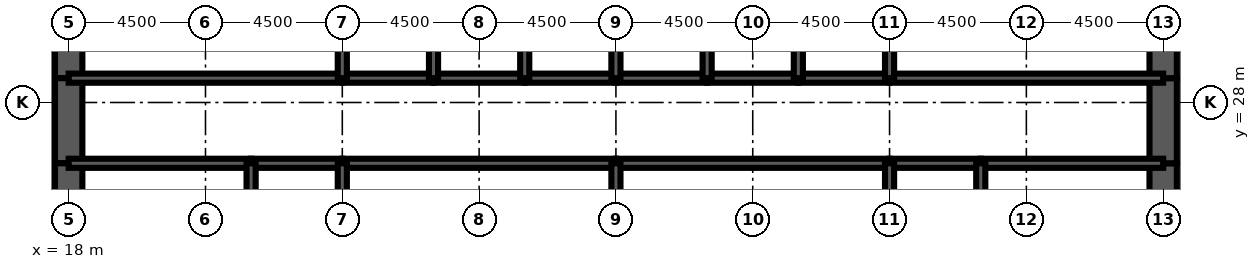
"""IFC4 building model, lengths in metres.
Left out: names, types, materials, properties, quantities, classifications, styles, units other than length and angle.
Written with IfcOpenShell. Run it as: python <this file> out.ifc"""

import sys

from ifc_helpers import new_model, si_unit, direction, frame, frame_2d, origin, place, context, subcontext, project, spatial, rectangle, extrude, element, fill, save


model = new_model("IFC4")
c1 = context("Model", 3, precision=1e-05, world=origin(), true_north=direction((0.0, 1.0)))
c2 = subcontext(c1, "Body", "Model", "MODEL_VIEW")
j1 = project(units=[si_unit("LENGTHUNIT", "METRE"), si_unit("PLANEANGLEUNIT", "RADIAN")], contexts=[c1])
p1 = place(None, origin())
s1 = spatial("IfcSite", under=j1, at=p1, CompositionType="ELEMENT")
p2 = place(p1, origin())
s2 = spatial("IfcBuilding", under=s1, at=p2, CompositionType="ELEMENT")
p3 = place(p2, frame((0.0, 0.0, 68.0)))
s3 = spatial("IfcBuildingStorey", under=s2, at=p3, CompositionType="ELEMENT", Elevation=68.0)
p4 = place(p3, frame((18.0, 32.0, 0.0), z_axis=(0.0, 0.0, 1.0), x_axis=(0.0, -1.0, 0.0)))
e1 = element("IfcWall", 1, at=p4, inside=s3, PredefinedType="SHEAR", context=c2, shape_type="SweptSolid", body=[
    extrude(rectangle(XDim=3.2, YDim=0.9, at=frame_2d((1.6, 0.0))), origin(), (0.0, 0.0, 1.0), 4.5),
])
p5 = place(p3, frame((18.0, 28.8, 0.0), z_axis=(0.0, 0.0, 1.0), x_axis=(0.0, -1.0, 0.0)))
e2 = element("IfcWall", 2, at=p5, inside=s3, PredefinedType="SHEAR", context=c2, shape_type="SweptSolid", body=[
    extrude(rectangle(XDim=2.8, YDim=0.9, at=frame_2d((1.4, 0.0))), origin(), (0.0, 0.0, 1.0), 4.5),
])
p6 = place(p5, frame((0.4, 0.0, 0.0)))
e3 = element("IfcOpeningElement", 3, at=p6, cuts=e2, PredefinedType="OPENING", context=c2, shape_type="SweptSolid", body=[
    extrude(rectangle(XDim=1.8, YDim=2.1, at=frame_2d((0.9, 1.05))), frame((0.0, 0.46, 0.0), z_axis=(0.0, -1.0, 0.0), x_axis=(1.0, 0.0, 0.0)), (0.0, 0.0, 1.0), 0.92),
])
for number, where, z_axis, x_axis in (
    (4, (18.0, 26.0, 0.0), (0.0, 0.0, 1.0), (0.0, -1.0, 0.0)),
    (5, (54.0, 22.0, 0.0), (0.0, 0.0, 1.0), (0.0, 1.0, 0.0)),
):
    element("IfcWall", number, at=place(p3, frame(where, z_axis=z_axis, x_axis=x_axis)), inside=s3, PredefinedType="SHEAR", context=c2, shape_type="SweptSolid", body=[
        extrude(rectangle(XDim=4.0, YDim=0.9, at=frame_2d((2.0, 0.0))), origin(), (0.0, 0.0, 1.0), 4.5),
    ])
p7 = place(p3, frame((54.0, 26.0, 0.0), z_axis=(0.0, 0.0, 1.0), x_axis=(0.0, 1.0, 0.0)))
e6 = element("IfcWall", 6, at=p7, inside=s3, PredefinedType="SHEAR", context=c2, shape_type="SweptSolid", body=[
    extrude(rectangle(XDim=2.8, YDim=0.9, at=frame_2d((1.4, 0.0))), origin(), (0.0, 0.0, 1.0), 4.5),
])
p8 = place(p7, frame((0.6, 0.0, 0.0)))
e7 = element("IfcOpeningElement", 7, at=p8, cuts=e6, PredefinedType="OPENING", context=c2, shape_type="SweptSolid", body=[
    extrude(rectangle(XDim=1.8, YDim=2.1, at=frame_2d((0.9, 1.05))), frame((0.0, 0.46, 0.0), z_axis=(0.0, -1.0, 0.0), x_axis=(1.0, 0.0, 0.0)), (0.0, 0.0, 1.0), 0.92),
])
p9 = place(p3, frame((54.0, 28.8, 0.0), z_axis=(0.0, 0.0, 1.0), x_axis=(0.0, 1.0, 0.0)))
e8 = element("IfcWall", 8, at=p9, inside=s3, PredefinedType="SHEAR", context=c2, shape_type="SweptSolid", body=[
    extrude(rectangle(XDim=3.2, YDim=0.9, at=frame_2d((1.6, 0.0))), origin(), (0.0, 0.0, 1.0), 4.5),
])
p10 = place(p3, frame((18.0, 28.8, 0.0), z_axis=(0.0, 0.0, 1.0), x_axis=(1.0, 0.0, 0.0)))
e9 = element("IfcWall", 9, at=p10, inside=s3, PredefinedType="SOLIDWALL", context=c2, shape_type="SweptSolid", body=[
    extrude(rectangle(XDim=9.0, YDim=0.3, at=frame_2d((4.5, 0.0))), origin(), (0.0, 0.0, 1.0), 4.5),
])
p11 = place(p10, frame((0.65, 0.0, 0.0)))
e10 = element("IfcOpeningElement", 10, at=p11, cuts=e9, PredefinedType="OPENING", context=c2, shape_type="SweptSolid", body=[
    extrude(rectangle(XDim=1.0, YDim=2.1, at=frame_2d((0.5, 1.05))), frame((0.0, 0.16, 0.0), z_axis=(0.0, -1.0, 0.0), x_axis=(1.0, 0.0, 0.0)), (0.0, 0.0, 1.0), 0.32),
])
p12 = place(p3, frame((27.0, 28.8, 0.0), z_axis=(0.0, 0.0, 1.0), x_axis=(1.0, 0.0, 0.0)))
e11 = element("IfcWall", 11, at=p12, inside=s3, PredefinedType="SOLIDWALL", context=c2, shape_type="SweptSolid", body=[
    extrude(rectangle(XDim=3.0, YDim=0.3, at=frame_2d((1.5, 0.0))), origin(), (0.0, 0.0, 1.0), 4.5),
])
p13 = place(p12, frame((0.95, 0.0, 0.0)))
e12 = element("IfcOpeningElement", 12, at=p13, cuts=e11, PredefinedType="OPENING", context=c2, shape_type="SweptSolid", body=[
    extrude(rectangle(XDim=1.1, YDim=2.2, at=frame_2d((0.55, 1.1))), frame((0.0, 0.16, 0.0), z_axis=(0.0, -1.0, 0.0), x_axis=(1.0, 0.0, 0.0)), (0.0, 0.0, 1.0), 0.32),
])
p14 = place(p3, frame((30.0, 28.8, 0.0), z_axis=(0.0, 0.0, 1.0), x_axis=(1.0, 0.0, 0.0)))
e13 = element("IfcWall", 13, at=p14, inside=s3, PredefinedType="SOLIDWALL", context=c2, shape_type="SweptSolid", body=[
    extrude(rectangle(XDim=3.0, YDim=0.3, at=frame_2d((1.5, 0.0))), origin(), (0.0, 0.0, 1.0), 4.5),
])
p15 = place(p14, frame((0.95, 0.0, 0.0)))
e14 = element("IfcOpeningElement", 14, at=p15, cuts=e13, PredefinedType="OPENING", context=c2, shape_type="SweptSolid", body=[
    extrude(rectangle(XDim=1.1, YDim=2.2, at=frame_2d((0.55, 1.1))), frame((0.0, 0.16, 0.0), z_axis=(0.0, -1.0, 0.0), x_axis=(1.0, 0.0, 0.0)), (0.0, 0.0, 1.0), 0.32),
])
p16 = place(p3, frame((33.0, 28.8, 0.0), z_axis=(0.0, 0.0, 1.0), x_axis=(1.0, 0.0, 0.0)))
e15 = element("IfcWall", 15, at=p16, inside=s3, PredefinedType="SOLIDWALL", context=c2, shape_type="SweptSolid", body=[
    extrude(rectangle(XDim=3.0, YDim=0.3, at=frame_2d((1.5, 0.0))), origin(), (0.0, 0.0, 1.0), 4.5),
])
p17 = place(p16, frame((0.95, 0.0, 0.0)))
e16 = element("IfcOpeningElement", 16, at=p17, cuts=e15, PredefinedType="OPENING", context=c2, shape_type="SweptSolid", body=[
    extrude(rectangle(XDim=1.1, YDim=2.2, at=frame_2d((0.55, 1.1))), frame((0.0, 0.16, 0.0), z_axis=(0.0, -1.0, 0.0), x_axis=(1.0, 0.0, 0.0)), (0.0, 0.0, 1.0), 0.32),
])
for number, where, z_axis, x_axis in (
    (17, (36.0, 28.8, 0.0), (0.0, 0.0, 1.0), (1.0, 0.0, 0.0)),
    (18, (39.0, 28.8, 0.0), (0.0, 0.0, 1.0), (1.0, 0.0, 0.0)),
):
    element("IfcWall", number, at=place(p3, frame(where, z_axis=z_axis, x_axis=x_axis)), inside=s3, PredefinedType="SOLIDWALL", context=c2, shape_type="SweptSolid", body=[
        extrude(rectangle(XDim=3.0, YDim=0.3, at=frame_2d((1.5, 0.0))), origin(), (0.0, 0.0, 1.0), 4.5),
    ])
p18 = place(p3, frame((42.0, 28.8, 0.0), z_axis=(0.0, 0.0, 1.0), x_axis=(1.0, 0.0, 0.0)))
e19 = element("IfcWall", 19, at=p18, inside=s3, PredefinedType="SOLIDWALL", context=c2, shape_type="SweptSolid", body=[
    extrude(rectangle(XDim=3.0, YDim=0.3, at=frame_2d((1.5, 0.0))), origin(), (0.0, 0.0, 1.0), 4.5),
])
p19 = place(p18, frame((0.95, 0.0, 0.0)))
e20 = element("IfcOpeningElement", 20, at=p19, cuts=e19, PredefinedType="OPENING", context=c2, shape_type="SweptSolid", body=[
    extrude(rectangle(XDim=1.1, YDim=2.2, at=frame_2d((0.55, 1.1))), frame((0.0, 0.16, 0.0), z_axis=(0.0, -1.0, 0.0), x_axis=(1.0, 0.0, 0.0)), (0.0, 0.0, 1.0), 0.32),
])
p20 = place(p3, frame((45.0, 28.8, 0.0), z_axis=(0.0, 0.0, 1.0), x_axis=(1.0, 0.0, 0.0)))
e21 = element("IfcWall", 21, at=p20, inside=s3, PredefinedType="SOLIDWALL", context=c2, shape_type="SweptSolid", body=[
    extrude(rectangle(XDim=9.0, YDim=0.3, at=frame_2d((4.5, 0.0))), origin(), (0.0, 0.0, 1.0), 4.5),
])
p21 = place(p20, frame((7.35, 0.0, 0.0)))
e22 = element("IfcOpeningElement", 22, at=p21, cuts=e21, PredefinedType="OPENING", context=c2, shape_type="SweptSolid", body=[
    extrude(rectangle(XDim=1.0, YDim=2.1, at=frame_2d((0.5, 1.05))), frame((0.0, 0.16, 0.0), z_axis=(0.0, -1.0, 0.0), x_axis=(1.0, 0.0, 0.0)), (0.0, 0.0, 1.0), 0.32),
])
p22 = place(p3, frame((18.0, 26.0, 0.0), z_axis=(0.0, 0.0, 1.0), x_axis=(1.0, 0.0, 0.0)))
e23 = element("IfcWall", 23, at=p22, inside=s3, PredefinedType="SOLIDWALL", context=c2, shape_type="SweptSolid", body=[
    extrude(rectangle(XDim=6.0, YDim=0.3, at=frame_2d((3.0, 0.0))), origin(), (0.0, 0.0, 1.0), 4.5),
])
p23 = place(p3, frame((24.0, 26.0, 0.0), z_axis=(0.0, 0.0, 1.0), x_axis=(1.0, 0.0, 0.0)))
e24 = element("IfcWall", 24, at=p23, inside=s3, PredefinedType="SOLIDWALL", context=c2, shape_type="SweptSolid", body=[
    extrude(rectangle(XDim=3.0, YDim=0.3, at=frame_2d((1.5, 0.0))), origin(), (0.0, 0.0, 1.0), 4.5),
])
for number, where, z_axis, x_axis in (
    (25, (27.0, 26.0, 0.0), (0.0, 0.0, 1.0), (1.0, 0.0, 0.0)),
    (26, (36.0, 26.0, 0.0), (0.0, 0.0, 1.0), (1.0, 0.0, 0.0)),
):
    element("IfcWall", number, at=place(p3, frame(where, z_axis=z_axis, x_axis=x_axis)), inside=s3, PredefinedType="SOLIDWALL", context=c2, shape_type="SweptSolid", body=[
        extrude(rectangle(XDim=9.0, YDim=0.3, at=frame_2d((4.5, 0.0))), origin(), (0.0, 0.0, 1.0), 4.5),
    ])
p24 = place(p3, frame((45.0, 26.0, 0.0), z_axis=(0.0, 0.0, 1.0), x_axis=(1.0, 0.0, 0.0)))
e27 = element("IfcWall", 27, at=p24, inside=s3, PredefinedType="SOLIDWALL", context=c2, shape_type="SweptSolid", body=[
    extrude(rectangle(XDim=3.0, YDim=0.3, at=frame_2d((1.5, 0.0))), origin(), (0.0, 0.0, 1.0), 4.5),
])
p25 = place(p3, frame((48.0, 26.0, 0.0), z_axis=(0.0, 0.0, 1.0), x_axis=(1.0, 0.0, 0.0)))
e28 = element("IfcWall", 28, at=p25, inside=s3, PredefinedType="SOLIDWALL", context=c2, shape_type="SweptSolid", body=[
    extrude(rectangle(XDim=6.0, YDim=0.3, at=frame_2d((3.0, 0.0))), origin(), (0.0, 0.0, 1.0), 4.5),
])
for number, where, z_axis, x_axis in (
    (29, (27.0, 28.8, 0.0), (0.0, 0.0, 1.0), (0.0, 1.0, 0.0)),
    (30, (30.0, 28.8, 0.0), (0.0, 0.0, 1.0), (0.0, 1.0, 0.0)),
    (31, (33.0, 28.8, 0.0), (0.0, 0.0, 1.0), (0.0, 1.0, 0.0)),
    (32, (36.0, 28.8, 0.0), (0.0, 0.0, 1.0), (0.0, 1.0, 0.0)),
    (33, (39.0, 28.8, 0.0), (0.0, 0.0, 1.0), (0.0, 1.0, 0.0)),
    (34, (42.0, 28.8, 0.0), (0.0, 0.0, 1.0), (0.0, 1.0, 0.0)),
    (35, (45.0, 28.8, 0.0), (0.0, 0.0, 1.0), (0.0, 1.0, 0.0)),
):
    element("IfcWall", number, at=place(p3, frame(where, z_axis=z_axis, x_axis=x_axis)), inside=s3, PredefinedType="SOLIDWALL", context=c2, shape_type="SweptSolid", body=[
        extrude(rectangle(XDim=3.2, YDim=0.3, at=frame_2d((1.6, 0.0))), origin(), (0.0, 0.0, 1.0), 4.5),
    ])
for number, where, z_axis, x_axis in (
    (36, (24.0, 22.0, 0.0), (0.0, 0.0, 1.0), (0.0, 1.0, 0.0)),
    (37, (27.0, 22.0, 0.0), (0.0, 0.0, 1.0), (0.0, 1.0, 0.0)),
    (38, (36.0, 22.0, 0.0), (0.0, 0.0, 1.0), (0.0, 1.0, 0.0)),
    (39, (45.0, 22.0, 0.0), (0.0, 0.0, 1.0), (0.0, 1.0, 0.0)),
    (40, (48.0, 22.0, 0.0), (0.0, 0.0, 1.0), (0.0, 1.0, 0.0)),
):
    element("IfcWall", number, at=place(p3, frame(where, z_axis=z_axis, x_axis=x_axis)), inside=s3, PredefinedType="SOLIDWALL", context=c2, shape_type="SweptSolid", body=[
        extrude(rectangle(XDim=4.0, YDim=0.3, at=frame_2d((2.0, 0.0))), origin(), (0.0, 0.0, 1.0), 4.5),
    ])
p26 = place(p3, frame((42.0, 22.15, 0.0), z_axis=(0.0, 0.0, 1.0), x_axis=(0.0, 1.0, 0.0)))
e41 = element("IfcWall", 41, at=p26, inside=s3, PredefinedType="PARTITIONING", context=c2, shape_type="SweptSolid", body=[
    extrude(rectangle(XDim=3.7, YDim=0.15, at=frame_2d((1.85, 0.0))), origin(), (0.0, 0.0, 1.0), 3.0),
])
p27 = place(p26, frame((2.2, 0.0, 0.0)))
e42 = element("IfcOpeningElement", 42, at=p27, cuts=e41, PredefinedType="OPENING", context=c2, shape_type="SweptSolid", body=[
    extrude(rectangle(XDim=1.0, YDim=2.1, at=frame_2d((0.5, 1.05))), frame((0.0, 0.085, 0.0), z_axis=(0.0, -1.0, 0.0), x_axis=(1.0, 0.0, 0.0)), (0.0, 0.0, 1.0), 0.17),
])
for number, where, z_axis, x_axis in (
    (43, (20.025, 22.15, 0.0), (0.0, 0.0, 1.0), (0.0, 1.0, 0.0)),
    (44, (51.375, 22.15, 0.0), (0.0, 0.0, 1.0), (0.0, 1.0, 0.0)),
):
    element("IfcWall", number, at=place(p3, frame(where, z_axis=z_axis, x_axis=x_axis)), inside=s3, PredefinedType="PARTITIONING", context=c2, shape_type="SweptSolid", body=[
        extrude(rectangle(XDim=3.7, YDim=0.15, at=frame_2d((1.85, 0.0))), origin(), (0.0, 0.0, 1.0), 3.0),
    ])
p28 = place(p27, origin())
e45 = element("IfcDoor", 45, at=p28, inside=s3, OperationType="SINGLE_SWING_RIGHT", PredefinedType="DOOR", context=c2, shape_type="SweptSolid", body=[
    extrude(rectangle(XDim=1.0, YDim=2.1, at=frame_2d((0.5, 1.05))), frame((0.0, 0.025, 0.0), z_axis=(0.0, -1.0, 0.0), x_axis=(1.0, 0.0, 0.0)), (0.0, 0.0, 1.0), 0.05),
])
fill(e42, e45)
p29 = place(p19, origin())
e46 = element("IfcDoor", 46, at=p29, inside=s3, OperationType="DOUBLE_DOOR_SLIDING", PredefinedType="USERDEFINED", context=c2, shape_type="SweptSolid", body=[
    extrude(rectangle(XDim=1.1, YDim=2.2, at=frame_2d((0.55, 1.1))), frame((0.0, 0.025, 0.0), z_axis=(0.0, -1.0, 0.0), x_axis=(1.0, 0.0, 0.0)), (0.0, 0.0, 1.0), 0.05),
])
fill(e20, e46)
p30 = place(p13, origin())
e47 = element("IfcDoor", 47, at=p30, inside=s3, OperationType="DOUBLE_DOOR_SLIDING", PredefinedType="USERDEFINED", context=c2, shape_type="SweptSolid", body=[
    extrude(rectangle(XDim=1.1, YDim=2.2, at=frame_2d((0.55, 1.1))), frame((0.0, 0.025, 0.0), z_axis=(0.0, -1.0, 0.0), x_axis=(1.0, 0.0, 0.0)), (0.0, 0.0, 1.0), 0.05),
])
fill(e12, e47)
p31 = place(p15, origin())
e48 = element("IfcDoor", 48, at=p31, inside=s3, OperationType="DOUBLE_DOOR_SLIDING", PredefinedType="USERDEFINED", context=c2, shape_type="SweptSolid", body=[
    extrude(rectangle(XDim=1.1, YDim=2.2, at=frame_2d((0.55, 1.1))), frame((0.0, 0.025, 0.0), z_axis=(0.0, -1.0, 0.0), x_axis=(1.0, 0.0, 0.0)), (0.0, 0.0, 1.0), 0.05),
])
fill(e14, e48)
p32 = place(p17, origin())
e49 = element("IfcDoor", 49, at=p32, inside=s3, OperationType="DOUBLE_DOOR_SLIDING", PredefinedType="USERDEFINED", context=c2, shape_type="SweptSolid", body=[
    extrude(rectangle(XDim=1.1, YDim=2.2, at=frame_2d((0.55, 1.1))), frame((0.0, 0.025, 0.0), z_axis=(0.0, -1.0, 0.0), x_axis=(1.0, 0.0, 0.0)), (0.0, 0.0, 1.0), 0.05),
])
fill(e16, e49)
p33 = place(p11, origin())
e50 = element("IfcDoor", 50, at=p33, inside=s3, OperationType="SINGLE_SWING_LEFT", PredefinedType="DOOR", context=c2, shape_type="SweptSolid", body=[
    extrude(rectangle(XDim=1.0, YDim=2.1, at=frame_2d((0.5, 1.05))), frame((0.0, 0.025, 0.0), z_axis=(0.0, -1.0, 0.0), x_axis=(1.0, 0.0, 0.0)), (0.0, 0.0, 1.0), 0.05),
])
fill(e10, e50)
p34 = place(p21, origin())
e51 = element("IfcDoor", 51, at=p34, inside=s3, OperationType="SINGLE_SWING_RIGHT", PredefinedType="DOOR", context=c2, shape_type="SweptSolid", body=[
    extrude(rectangle(XDim=1.0, YDim=2.1, at=frame_2d((0.5, 1.05))), frame((0.0, 0.025, 0.0), z_axis=(0.0, -1.0, 0.0), x_axis=(1.0, 0.0, 0.0)), (0.0, 0.0, 1.0), 0.05),
])
fill(e22, e51)
p35 = place(p6, origin())
e52 = element("IfcDoor", 52, at=p35, inside=s3, OperationType="SINGLE_SWING_LEFT", PredefinedType="DOOR", context=c2, shape_type="SweptSolid", body=[
    extrude(rectangle(XDim=1.8, YDim=2.1, at=frame_2d((0.9, 1.05))), frame((0.0, 0.45, 0.0), z_axis=(0.0, -1.0, 0.0), x_axis=(1.0, 0.0, 0.0)), (0.0, 0.0, 1.0), 0.899),
])
fill(e3, e52)
p36 = place(p8, origin())
e53 = element("IfcDoor", 53, at=p36, inside=s3, OperationType="SINGLE_SWING_LEFT", PredefinedType="DOOR", context=c2, shape_type="SweptSolid", body=[
    extrude(rectangle(XDim=1.8, YDim=2.1, at=frame_2d((0.9, 1.05))), frame((0.0, 0.45, 0.0), z_axis=(0.0, -1.0, 0.0), x_axis=(1.0, 0.0, 0.0)), (0.0, 0.0, 1.0), 0.899),
])
fill(e7, e53)
save(model, sys.argv[1])
